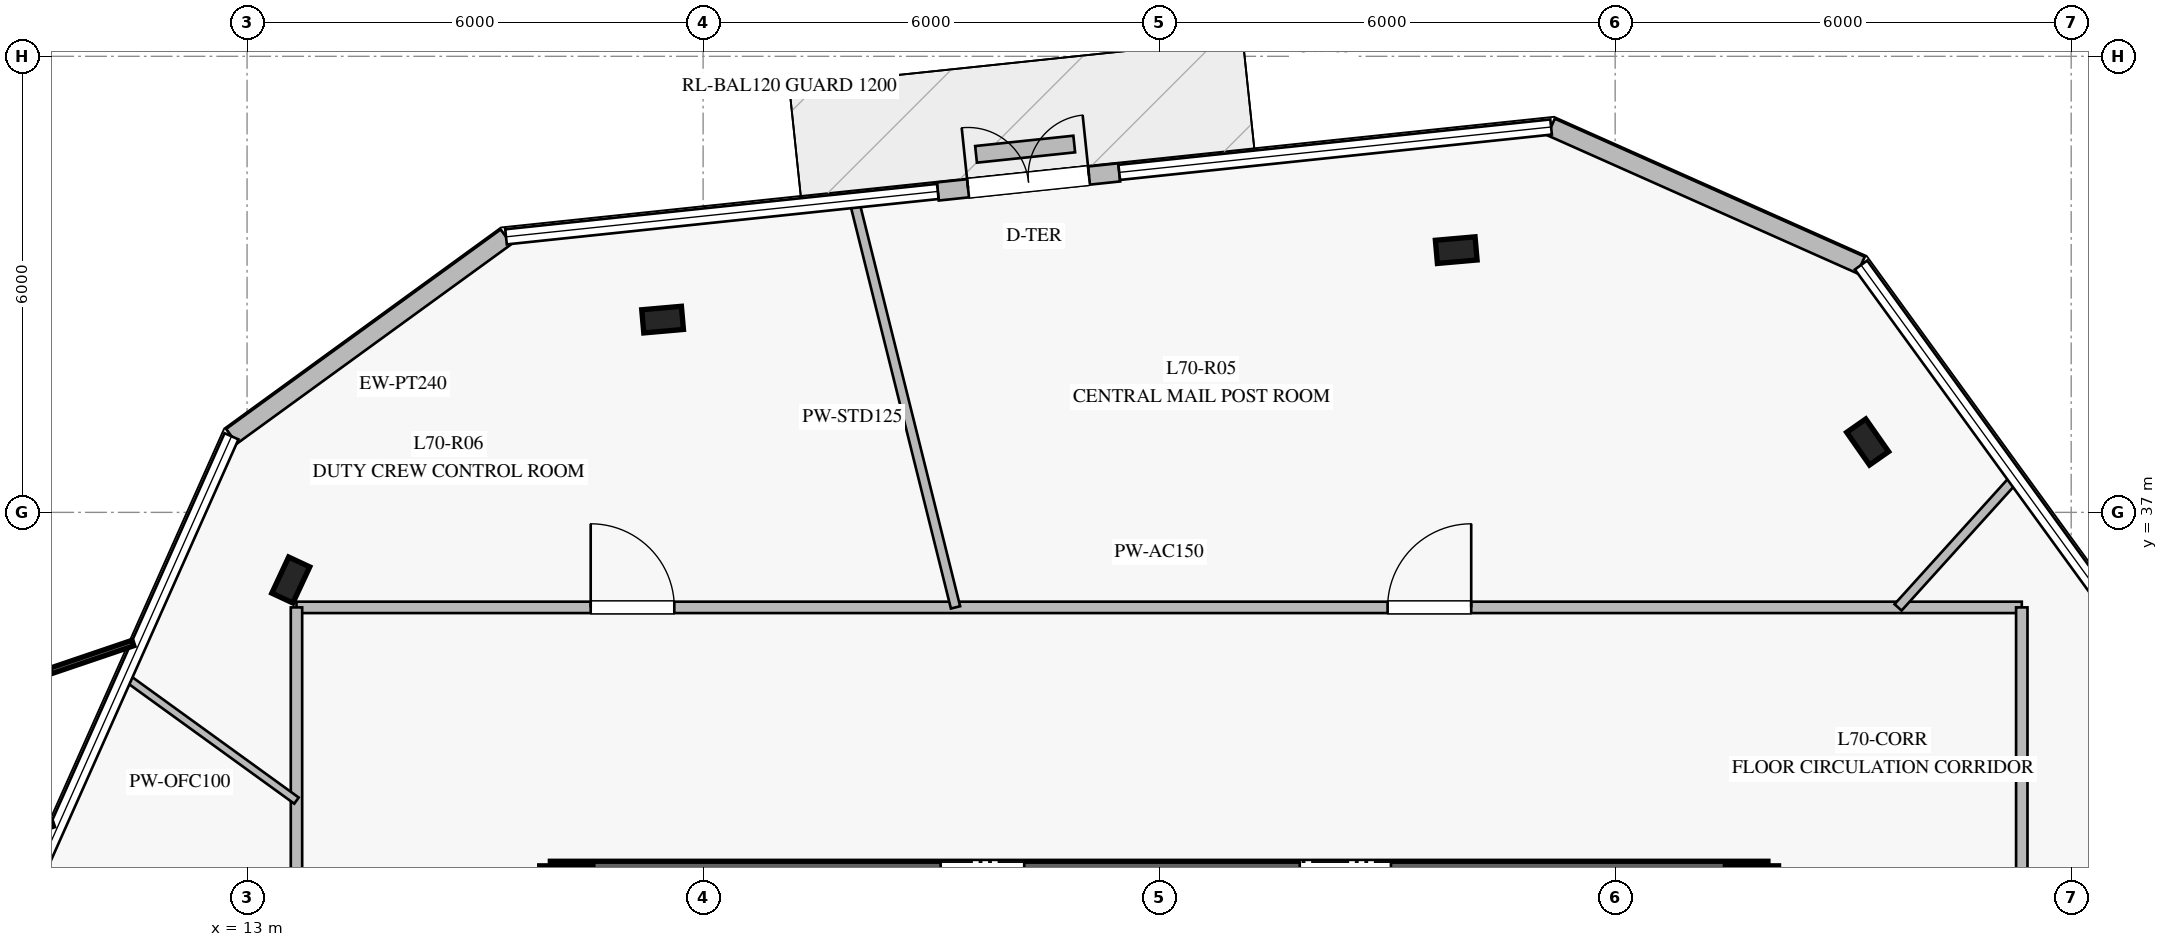
"""IFC4 building model, lengths in metres.
Left out: names, types, materials, properties, quantities, classifications, styles, units other than length and angle.
Written with IfcOpenShell. Run it as: python <this file> out.ifc"""

import sys

from ifc_helpers import new_model, si_unit, direction, frame, frame_2d, origin, origin_2d, place, context, subcontext, project, spatial, rectangle, i_section, extrude, element, fill, save


model = new_model("IFC4")
c1 = context("Model", 3, precision=1e-05, world=origin(), true_north=direction((0.0, 1.0)))
c2 = subcontext(c1, "Body", "Model", "MODEL_VIEW")
j1 = project(units=[si_unit("LENGTHUNIT", "METRE"), si_unit("PLANEANGLEUNIT", "RADIAN")], contexts=[c1])
p1 = place(None, origin())
s1 = spatial("IfcSite", under=j1, at=p1, CompositionType="ELEMENT")
p2 = place(p1, origin())
s2 = spatial("IfcBuilding", under=s1, at=p2, CompositionType="ELEMENT")
p3 = place(p2, frame((0.0, 0.0, 290.2)))
s3 = spatial("IfcBuildingStorey", under=s2, at=p3, CompositionType="ELEMENT", Elevation=290.2)
p4 = place(p3, frame((33.01, 32.2, 0.0), z_axis=(0.0, 0.0, 1.0), x_axis=(-1.0, 0.0, 0.0)))
e1 = element("IfcWall", 1, at=p4, inside=s3, PredefinedType="SHEAR", context=c2, shape_type="SweptSolid", body=[
    extrude(rectangle(XDim=16.02, YDim=0.42, at=frame_2d((8.01, 0.0))), origin(), (0.0, 0.0, 1.0), 3.78),
])
p5 = place(p4, frame((4.96, 0.0, 0.0)))
e2 = element("IfcOpeningElement", 2, at=p5, cuts=e1, PredefinedType="OPENING", context=c2, shape_type="SweptSolid", body=[
    extrude(rectangle(XDim=1.2, YDim=2.25, at=frame_2d((0.6, 1.125))), frame((0.0, 0.22, 0.0), z_axis=(0.0, -1.0, 0.0), x_axis=(1.0, 0.0, 0.0)), (0.0, 0.0, 1.0), 0.44),
])
p6 = place(p4, frame((9.785, 0.0, 0.0)))
e3 = element("IfcOpeningElement", 3, at=p6, cuts=e1, PredefinedType="OPENING", context=c2, shape_type="SweptSolid", body=[
    extrude(rectangle(XDim=1.1, YDim=2.2, at=frame_2d((0.55, 1.1))), frame((0.0, 0.22, 0.0), z_axis=(0.0, -1.0, 0.0), x_axis=(1.0, 0.0, 0.0)), (0.0, 0.0, 1.0), 0.44),
])
for number, where, z_axis, x_axis in (
    (4, (32.8, 32.2, 0.0), (0.0, 0.0, 1.0), (1.0, 0.0, 0.0)),
    (5, (17.2, 32.2, 0.0), (0.0, 0.0, 1.0), (1.0, 0.0, 0.0)),
):
    element("IfcColumn", number, at=place(p3, frame(where, z_axis=z_axis, x_axis=x_axis)), inside=s3, PredefinedType="COLUMN", context=c2, shape_type="SweptSolid", body=[
        extrude(i_section(OverallWidth=0.3, OverallDepth=0.7, WebThickness=0.017, FlangeThickness=0.032, at=origin_2d()), origin(), (0.0, 0.0, 1.0), 4.0),
    ])
for number, where, z_axis, x_axis in (
    (6, (28.909, 40.45, 0.0), (0.0, 0.0, 1.0), (0.996, 0.087, 0.0)),
    (7, (18.467, 39.536, 0.0), (0.0, 0.0, 1.0), (0.996, 0.087, 0.0)),
    (8, (13.575, 36.11, 0.0), (0.0, 0.0, 1.0), (0.423, 0.906, 0.0)),
    (9, (34.322, 37.926, 0.0), (0.0, 0.0, 1.0), (-0.574, 0.819, 0.0)),
):
    element("IfcColumn", number, at=place(p3, frame(where, z_axis=z_axis, x_axis=x_axis)), inside=s3, PredefinedType="COLUMN", context=c2, shape_type="SweptSolid", body=[
        extrude(i_section(OverallWidth=0.306, OverallDepth=0.524, WebThickness=0.021, FlangeThickness=0.04, at=origin_2d()), origin(), (0.0, 0.0, 1.0), 4.0),
    ])
p7 = place(p3, frame((24.475, 41.473, 0.0), z_axis=(0.0, 0.0, 1.0), x_axis=(-0.994518820344, -0.104557716027, 0.0)))
e10 = element("IfcWall", 10, at=p7, inside=s3, PredefinedType="STANDARD", context=c2, shape_type="SweptSolid", body=[
    extrude(rectangle(XDim=2.4, YDim=0.24, at=frame_2d((1.2, 0.0))), origin(), (0.0, 0.0, 1.0), 3.78),
])
p8 = place(p7, frame((0.4, 0.0, 0.0)))
e11 = element("IfcOpeningElement", 11, at=p8, cuts=e10, PredefinedType="OPENING", context=c2, shape_type="SweptSolid", body=[
    extrude(rectangle(XDim=1.6, YDim=2.25, at=frame_2d((0.8, 1.125))), frame((0.0, 0.13, 0.0), z_axis=(0.0, -1.0, 0.0), x_axis=(1.0, 0.0, 0.0)), (0.0, 0.0, 1.0), 0.26),
])
p9 = place(p3, frame((16.407, 40.625, 0.0), z_axis=(0.0, 0.0, 1.0), x_axis=(-0.809048111957, -0.587742420231, 0.0)))
e12 = element("IfcWall", 12, at=p9, inside=s3, PredefinedType="STANDARD", context=c2, shape_type="SweptSolid", body=[
    extrude(rectangle(XDim=4.465, YDim=0.24, at=frame_2d((2.232, 0.0))), origin(), (0.0, 0.0, 1.0), 3.78),
])
p10 = place(p3, frame((34.235, 40.254, 0.0), z_axis=(0.0, 0.0, 1.0), x_axis=(-0.913506843716, 0.406823360297, 0.0)))
e13 = element("IfcWall", 13, at=p10, inside=s3, PredefinedType="STANDARD", context=c2, shape_type="SweptSolid", body=[
    extrude(rectangle(XDim=4.464, YDim=0.24, at=frame_2d((2.232, 0.0))), origin(), (0.0, 0.0, 1.0), 3.78),
])
p11 = place(p3, frame((23.883, 41.846, 0.0), z_axis=(0.0, 0.0, 1.0), x_axis=(-0.994506482607, -0.104675002043, 0.0)))
e14 = element("IfcWall", 14, at=p11, inside=s3, PredefinedType="USERDEFINED", context=c2, shape_type="SweptSolid", body=[
    extrude(rectangle(XDim=1.299, YDim=0.22, at=frame_2d((0.649, 0.0))), origin(), (0.0, 0.0, 1.0), 0.4),
])
p12 = place(p3, frame((13.65, 35.75, 0.0), z_axis=(0.0, 0.0, 1.0), x_axis=(1.0, 0.0, 0.0)))
e15 = element("IfcWall", 15, at=p12, inside=s3, PredefinedType="PARTITIONING", context=c2, shape_type="SweptSolid", body=[
    extrude(rectangle(XDim=22.7, YDim=0.15, at=frame_2d((11.35, 0.0))), origin(), (0.0, 0.0, 1.0), 3.28),
])
p13 = place(p12, frame((14.356, 0.0, 0.0)))
e16 = element("IfcOpeningElement", 16, at=p13, cuts=e15, PredefinedType="OPENING", context=c2, shape_type="SweptSolid", body=[
    extrude(rectangle(XDim=1.1, YDim=2.2, at=frame_2d((0.55, 1.1))), frame((0.0, 0.085, 0.0), z_axis=(0.0, -1.0, 0.0), x_axis=(1.0, 0.0, 0.0)), (0.0, 0.0, 1.0), 0.17),
])
p14 = place(p12, frame((3.871, 0.0, 0.0)))
e17 = element("IfcOpeningElement", 17, at=p14, cuts=e15, PredefinedType="OPENING", context=c2, shape_type="SweptSolid", body=[
    extrude(rectangle(XDim=1.1, YDim=2.2, at=frame_2d((0.55, 1.1))), frame((0.0, 0.085, 0.0), z_axis=(0.0, -1.0, 0.0), x_axis=(1.0, 0.0, 0.0)), (0.0, 0.0, 1.0), 0.17),
])
p15 = place(p3, frame((36.35, 35.75, 0.0), z_axis=(0.0, 0.0, 1.0), x_axis=(0.0, -1.0, 0.0)))
e18 = element("IfcWall", 18, at=p15, inside=s3, PredefinedType="PARTITIONING", context=c2, shape_type="SweptSolid", body=[
    extrude(rectangle(XDim=21.5, YDim=0.15, at=frame_2d((10.75, 0.0))), origin(), (0.0, 0.0, 1.0), 3.05),
])
p16 = place(p15, frame((15.421, 0.0, 0.0)))
e19 = element("IfcOpeningElement", 19, at=p16, cuts=e18, PredefinedType="OPENING", context=c2, shape_type="SweptSolid", body=[
    extrude(rectangle(XDim=1.1, YDim=2.2, at=frame_2d((0.55, 1.1))), frame((0.0, 0.085, 0.0), z_axis=(0.0, -1.0, 0.0), x_axis=(1.0, 0.0, 0.0)), (0.0, 0.0, 1.0), 0.17),
])
p17 = place(p15, frame((5.127, 0.0, 0.0)))
e20 = element("IfcOpeningElement", 20, at=p17, cuts=e18, PredefinedType="OPENING", context=c2, shape_type="SweptSolid", body=[
    extrude(rectangle(XDim=1.1, YDim=2.2, at=frame_2d((0.55, 1.1))), frame((0.0, 0.085, 0.0), z_axis=(0.0, -1.0, 0.0), x_axis=(1.0, 0.0, 0.0)), (0.0, 0.0, 1.0), 0.17),
])
p18 = place(p3, frame((13.65, 14.25, 0.0), z_axis=(0.0, 0.0, 1.0), x_axis=(0.0, 1.0, 0.0)))
e21 = element("IfcWall", 21, at=p18, inside=s3, PredefinedType="PARTITIONING", context=c2, shape_type="SweptSolid", body=[
    extrude(rectangle(XDim=21.5, YDim=0.15, at=frame_2d((10.75, 0.0))), origin(), (0.0, 0.0, 1.0), 3.05),
])
p19 = place(p18, frame((12.906, 0.0, 0.0)))
e22 = element("IfcOpeningElement", 22, at=p19, cuts=e21, PredefinedType="OPENING", context=c2, shape_type="SweptSolid", body=[
    extrude(rectangle(XDim=1.1, YDim=2.2, at=frame_2d((0.55, 1.1))), frame((0.0, 0.085, 0.0), z_axis=(0.0, -1.0, 0.0), x_axis=(1.0, 0.0, 0.0)), (0.0, 0.0, 1.0), 0.17),
])
p20 = place(p3, frame((22.321, 35.75, 0.0), z_axis=(0.0, 0.0, 1.0), x_axis=(-0.241815465561, 0.970322256065, 0.0)))
e23 = element("IfcWall", 23, at=p20, inside=s3, PredefinedType="PARTITIONING", context=c2, shape_type="SweptSolid", body=[
    extrude(rectangle(XDim=5.504, YDim=0.125, at=frame_2d((2.752, 0.0))), origin(), (0.0, 0.0, 1.0), 3.28),
])
p21 = place(p3, frame((13.65, 33.208, 0.0), z_axis=(0.0, 0.0, 1.0), x_axis=(-0.810240415725, 0.586097661424, 0.0)))
e24 = element("IfcWall", 24, at=p21, inside=s3, PredefinedType="MOVABLE", context=c2, shape_type="SweptSolid", body=[
    extrude(rectangle(XDim=2.774, YDim=0.1, at=frame_2d((1.387, 0.0))), origin(), (0.0, 0.0, 1.0), 3.28),
])
p22 = place(p3, frame((34.722, 35.75, 0.0), z_axis=(0.0, 0.0, 1.0), x_axis=(0.670832257331, 0.741609117072, 0.0)))
e25 = element("IfcWall", 25, at=p22, inside=s3, PredefinedType="PARTITIONING", context=c2, shape_type="SweptSolid", body=[
    extrude(rectangle(XDim=2.287, YDim=0.125, at=frame_2d((1.144, 0.0))), origin(), (0.0, 0.0, 1.0), 3.28),
])
p23 = place(p8, frame((1.6, 0.0, 0.0), z_axis=(0.0, 0.0, 1.0), x_axis=(-1.0, 0.0, 0.0)))
e26 = element("IfcDoor", 26, at=p23, inside=s3, OperationType="DOUBLE_DOOR_SINGLE_SWING", PredefinedType="DOOR", context=c2, shape_type="SweptSolid", body=[
    extrude(rectangle(XDim=1.6, YDim=2.25, at=frame_2d((0.8, 1.125))), frame((0.0, 0.025, 0.0), z_axis=(0.0, -1.0, 0.0), x_axis=(1.0, 0.0, 0.0)), (0.0, 0.0, 1.0), 0.05),
])
fill(e11, e26)
p24 = place(p13, origin())
e27 = element("IfcDoor", 27, at=p24, inside=s3, OperationType="SINGLE_SWING_RIGHT", PredefinedType="DOOR", context=c2, shape_type="SweptSolid", body=[
    extrude(rectangle(XDim=1.1, YDim=2.2, at=frame_2d((0.55, 1.1))), frame((0.0, 0.025, 0.0), z_axis=(0.0, -1.0, 0.0), x_axis=(1.0, 0.0, 0.0)), (0.0, 0.0, 1.0), 0.05),
])
fill(e16, e27)
p25 = place(p14, origin())
e28 = element("IfcDoor", 28, at=p25, inside=s3, OperationType="SINGLE_SWING_LEFT", PredefinedType="DOOR", context=c2, shape_type="SweptSolid", body=[
    extrude(rectangle(XDim=1.1, YDim=2.2, at=frame_2d((0.55, 1.1))), frame((0.0, 0.025, 0.0), z_axis=(0.0, -1.0, 0.0), x_axis=(1.0, 0.0, 0.0)), (0.0, 0.0, 1.0), 0.05),
])
fill(e17, e28)
save(model, sys.argv[1])
